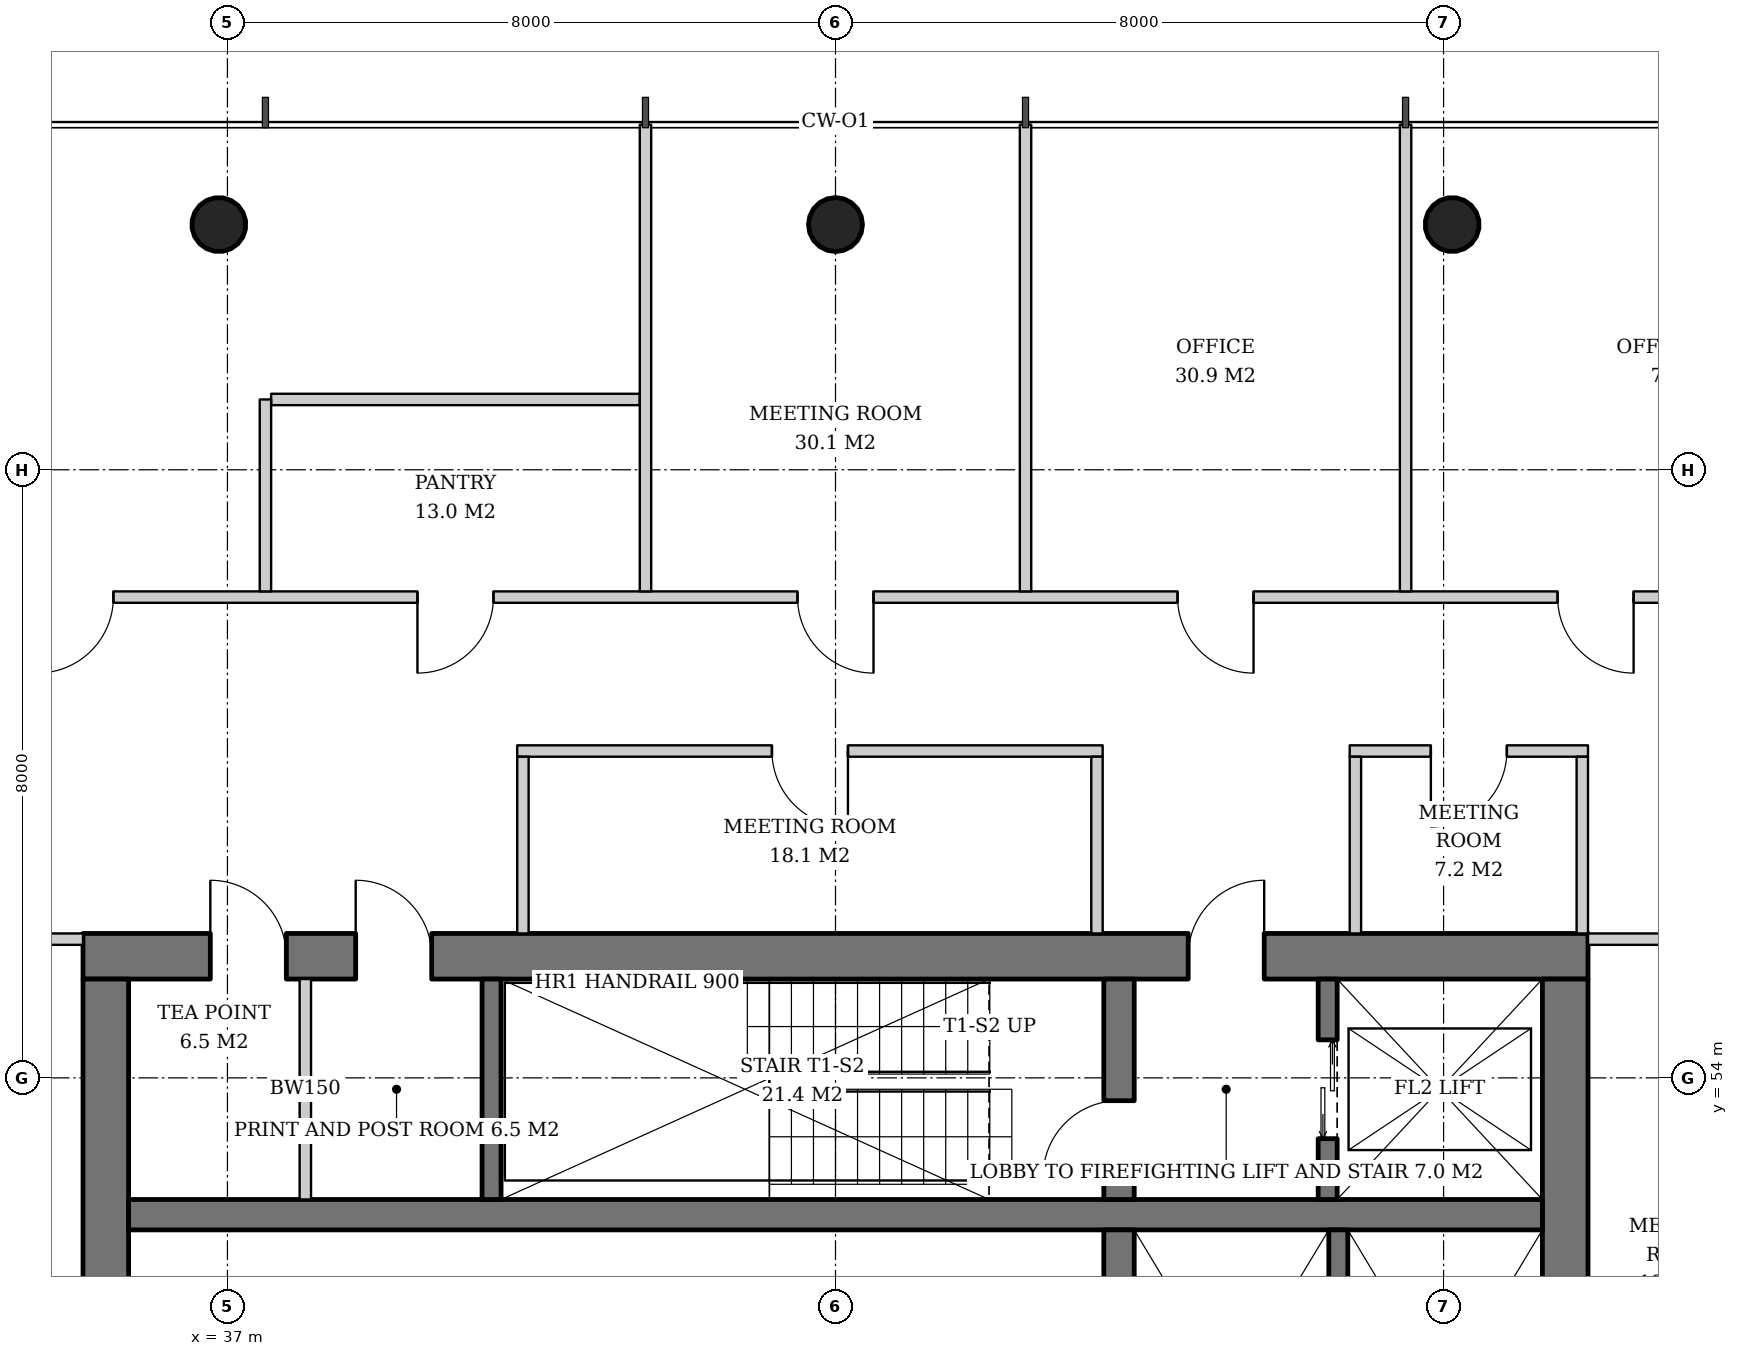
"""IFC4 building model, lengths in metres.
Left out: names, types, materials, properties, quantities, classifications, styles, units other than length and angle.
Written with IfcOpenShell. Run it as: python <this file> out.ifc"""

import sys

from ifc_helpers import new_model, si_unit, direction, frame, frame_2d, origin, origin_2d, place, context, subcontext, project, spatial, rectangle, hollow_circle, extrude, element, fill, save


model = new_model("IFC4")
c1 = context("Model", 3, precision=1e-05, world=origin(), true_north=direction((0.0, 1.0)))
c2 = subcontext(c1, "Body", "Model", "MODEL_VIEW")
j1 = project(units=[si_unit("LENGTHUNIT", "METRE"), si_unit("PLANEANGLEUNIT", "RADIAN")], contexts=[c1])
p1 = place(None, origin())
s1 = spatial("IfcSite", under=j1, at=p1, CompositionType="ELEMENT")
p2 = place(p1, origin())
s2 = spatial("IfcBuilding", under=s1, at=p2, CompositionType="ELEMENT")
p3 = place(p2, frame((0.0, 0.0, 169.2)))
s3 = spatial("IfcBuildingStorey", under=s2, at=p3, CompositionType="ELEMENT", Elevation=169.2)
p4 = place(p3, frame((53.132, 65.264, 0.0), z_axis=(-0.015923015547, -0.031974442509, 0.999361842679), x_axis=(0.895145027055, -0.445775033553, 0.0)))
e1 = element("IfcColumn", 1, at=p4, inside=s3, PredefinedType="COLUMN", context=c2, shape_type="SweptSolid", body=[
    extrude(hollow_circle(Radius=0.355, WallThickness=0.025, at=origin_2d()), origin(), (0.0, 0.0, 1.0), 3.802),
])
p5 = place(p3, frame((45.0, 65.264, 0.0), z_axis=(0.0, -0.031978496719, 0.999488557087), x_axis=(1.0, 0.0, 0.0)))
e2 = element("IfcColumn", 2, at=p5, inside=s3, PredefinedType="COLUMN", context=c2, shape_type="SweptSolid", body=[
    extrude(hollow_circle(Radius=0.355, WallThickness=0.025, at=origin_2d()), origin(), (0.0, 0.0, 1.0), 3.802),
])
p6 = place(p3, frame((36.868, 65.264, 0.0), z_axis=(0.015923015547, -0.031974442509, 0.999361842679), x_axis=(0.895145027055, 0.445775033553, 0.0)))
e3 = element("IfcColumn", 3, at=p6, inside=s3, PredefinedType="COLUMN", context=c2, shape_type="SweptSolid", body=[
    extrude(hollow_circle(Radius=0.355, WallThickness=0.025, at=origin_2d()), origin(), (0.0, 0.0, 1.0), 3.802),
])
p7 = place(p3, frame((35.1, 55.6, 0.0), z_axis=(0.0, 0.0, 1.0), x_axis=(1.0, 0.0, 0.0)))
e4 = element("IfcWall", 4, at=p7, inside=s3, PredefinedType="SHEAR", context=c2, shape_type="SweptSolid", body=[
    extrude(rectangle(XDim=19.8, YDim=0.6, at=frame_2d((9.9, 0.0))), origin(), (0.0, 0.0, 1.0), 3.8),
])
p8 = place(p7, frame((14.54, 0.0, 0.0)))
e5 = element("IfcOpeningElement", 5, at=p8, cuts=e4, PredefinedType="OPENING", context=c2, shape_type="SweptSolid", body=[
    extrude(rectangle(XDim=1.0, YDim=2.1, at=frame_2d((0.5, 1.05))), frame((0.0, 0.31, 0.0), z_axis=(0.0, -1.0, 0.0), x_axis=(1.0, 0.0, 0.0)), (0.0, 0.0, 1.0), 0.62),
])
p9 = place(p7, frame((1.675, 0.0, 0.0)))
e6 = element("IfcOpeningElement", 6, at=p9, cuts=e4, PredefinedType="OPENING", context=c2, shape_type="SweptSolid", body=[
    extrude(rectangle(XDim=1.0, YDim=2.1, at=frame_2d((0.5, 1.05))), frame((0.0, 0.31, 0.0), z_axis=(0.0, -1.0, 0.0), x_axis=(1.0, 0.0, 0.0)), (0.0, 0.0, 1.0), 0.62),
])
p10 = place(p7, frame((3.587, 0.0, 0.0)))
e7 = element("IfcOpeningElement", 7, at=p10, cuts=e4, PredefinedType="OPENING", context=c2, shape_type="SweptSolid", body=[
    extrude(rectangle(XDim=1.0, YDim=2.1, at=frame_2d((0.5, 1.05))), frame((0.0, 0.31, 0.0), z_axis=(0.0, -1.0, 0.0), x_axis=(1.0, 0.0, 0.0)), (0.0, 0.0, 1.0), 0.62),
])
p11 = place(p3, frame((35.4, 36.7, 0.0), z_axis=(0.0, 0.0, 1.0), x_axis=(0.0, 1.0, 0.0)))
e8 = element("IfcWall", 8, at=p11, inside=s3, PredefinedType="SHEAR", context=c2, shape_type="SweptSolid", body=[
    extrude(rectangle(XDim=18.6, YDim=0.6, at=frame_2d((9.3, 0.0))), origin(), (0.0, 0.0, 1.0), 3.8),
])
p12 = place(p11, frame((8.4, 0.0, 0.0)))
e9 = element("IfcOpeningElement", 9, at=p12, cuts=e8, PredefinedType="OPENING", context=c2, shape_type="SweptSolid", body=[
    extrude(rectangle(XDim=1.8, YDim=2.4, at=frame_2d((0.9, 1.2))), frame((0.0, 0.31, 0.0), z_axis=(0.0, -1.0, 0.0), x_axis=(1.0, 0.0, 0.0)), (0.0, 0.0, 1.0), 0.62),
])
p13 = place(p3, frame((54.6, 36.7, 0.0), z_axis=(0.0, 0.0, 1.0), x_axis=(0.0, 1.0, 0.0)))
e10 = element("IfcWall", 10, at=p13, inside=s3, PredefinedType="SHEAR", context=c2, shape_type="SweptSolid", body=[
    extrude(rectangle(XDim=18.6, YDim=0.6, at=frame_2d((9.3, 0.0))), origin(), (0.0, 0.0, 1.0), 3.8),
])
p14 = place(p13, frame((8.4, 0.0, 0.0)))
e11 = element("IfcOpeningElement", 11, at=p14, cuts=e10, PredefinedType="OPENING", context=c2, shape_type="SweptSolid", body=[
    extrude(rectangle(XDim=1.8, YDim=2.4, at=frame_2d((0.9, 1.2))), frame((0.0, 0.31, 0.0), z_axis=(0.0, -1.0, 0.0), x_axis=(1.0, 0.0, 0.0)), (0.0, 0.0, 1.0), 0.62),
])
p15 = place(p3, frame((35.7, 52.2, 0.0), z_axis=(0.0, 0.0, 1.0), x_axis=(1.0, 0.0, 0.0)))
e12 = element("IfcWall", 12, at=p15, inside=s3, PredefinedType="SHEAR", context=c2, shape_type="SweptSolid", body=[
    extrude(rectangle(XDim=18.6, YDim=0.4, at=frame_2d((9.3, 0.0))), origin(), (0.0, 0.0, 1.0), 3.8),
])
p16 = place(p3, frame((48.73, 40.0, 0.0), z_axis=(0.0, 0.0, 1.0), x_axis=(0.0, 1.0, 0.0)))
e13 = element("IfcWall", 13, at=p16, inside=s3, PredefinedType="SHEAR", context=c2, shape_type="SweptSolid", body=[
    extrude(rectangle(XDim=12.0, YDim=0.4, at=frame_2d((6.0, 0.0))), origin(), (0.0, 0.0, 1.0), 3.8),
])
p17 = place(p3, frame((48.73, 52.4, 0.0), z_axis=(0.0, 0.0, 1.0), x_axis=(0.0, 1.0, 0.0)))
e14 = element("IfcWall", 14, at=p17, inside=s3, PredefinedType="SHEAR", context=c2, shape_type="SweptSolid", body=[
    extrude(rectangle(XDim=2.9, YDim=0.4, at=frame_2d((1.45, 0.0))), origin(), (0.0, 0.0, 1.0), 3.8),
])
p18 = place(p17, frame((0.3, 0.0, 0.0)))
e15 = element("IfcOpeningElement", 15, at=p18, cuts=e14, PredefinedType="OPENING", context=c2, shape_type="SweptSolid", body=[
    extrude(rectangle(XDim=1.0, YDim=2.1, at=frame_2d((0.5, 1.05))), frame((0.0, 0.21, 0.0), z_axis=(0.0, -1.0, 0.0), x_axis=(1.0, 0.0, 0.0)), (0.0, 0.0, 1.0), 0.42),
])
p19 = place(p3, frame((40.475, 52.4, 0.0), z_axis=(0.0, 0.0, 1.0), x_axis=(0.0, 1.0, 0.0)))
e16 = element("IfcWall", 16, at=p19, inside=s3, PredefinedType="SHEAR", context=c2, shape_type="SweptSolid", body=[
    extrude(rectangle(XDim=2.9, YDim=0.25, at=frame_2d((1.45, 0.0))), origin(), (0.0, 0.0, 1.0), 3.8),
])
p20 = place(p3, frame((51.475, 52.4, 0.0), z_axis=(0.0, 0.0, 1.0), x_axis=(0.0, 1.0, 0.0)))
e17 = element("IfcWall", 17, at=p20, inside=s3, PredefinedType="SHEAR", context=c2, shape_type="SweptSolid", body=[
    extrude(rectangle(XDim=2.9, YDim=0.25, at=frame_2d((1.45, 0.0))), origin(), (0.0, 0.0, 1.0), 3.8),
])
p21 = place(p20, frame((0.8, 0.0, 0.0)))
e18 = element("IfcOpeningElement", 18, at=p21, cuts=e17, PredefinedType="OPENING", context=c2, shape_type="SweptSolid", body=[
    extrude(rectangle(XDim=1.3, YDim=2.2, at=frame_2d((0.65, 1.1))), frame((0.0, 0.135, 0.0), z_axis=(0.0, -1.0, 0.0), x_axis=(1.0, 0.0, 0.0)), (0.0, 0.0, 1.0), 0.27),
])
p22 = place(p3, frame((51.615, 47.75, 0.0), z_axis=(0.0, 0.0, 1.0), x_axis=(0.0, 1.0, 0.0)))
e19 = element("IfcWall", 19, at=p22, inside=s3, PredefinedType="SHEAR", context=c2, shape_type="SweptSolid", body=[
    extrude(rectangle(XDim=4.25, YDim=0.25, at=frame_2d((2.125, 0.0))), origin(), (0.0, 0.0, 1.0), 3.8),
])
p23 = place(p3, frame((38.025, 52.4, 0.0), z_axis=(0.0, 0.0, 1.0), x_axis=(0.0, 1.0, 0.0)))
e20 = element("IfcWall", 20, at=p23, inside=s3, PredefinedType="SOLIDWALL", context=c2, shape_type="SweptSolid", body=[
    extrude(rectangle(XDim=2.9, YDim=0.15, at=frame_2d((1.45, 0.0))), origin(), (0.0, 0.0, 1.0), 3.62),
])
p24 = place(p3, frame((54.9, 55.825, 0.0), z_axis=(0.0, 0.0, 1.0), x_axis=(1.0, 0.0, 0.0)))
e21 = element("IfcWall", 21, at=p24, inside=s3, PredefinedType="PARTITIONING", context=c2, shape_type="SweptSolid", body=[
    extrude(rectangle(XDim=2.325, YDim=0.15, at=frame_2d((1.163, 0.0))), origin(), (0.0, 0.0, 1.0), 3.62),
])
p25 = place(p3, frame((54.9, 58.3, 0.0), z_axis=(0.0, 0.0, 1.0), x_axis=(-1.0, 0.0, 0.0)))
e22 = element("IfcWall", 22, at=p25, inside=s3, PredefinedType="PARTITIONING", context=c2, shape_type="SweptSolid", body=[
    extrude(rectangle(XDim=3.135, YDim=0.15, at=frame_2d((1.567, 0.0))), origin(), (0.0, 0.0, 1.0), 2.92),
])
p26 = place(p25, frame((1.067, 0.0, 0.0)))
e23 = element("IfcOpeningElement", 23, at=p26, cuts=e22, PredefinedType="OPENING", context=c2, shape_type="SweptSolid", body=[
    extrude(rectangle(XDim=1.0, YDim=2.1, at=frame_2d((0.5, 1.05))), frame((0.0, 0.085, 0.0), z_axis=(0.0, -1.0, 0.0), x_axis=(1.0, 0.0, 0.0)), (0.0, 0.0, 1.0), 0.17),
])
p27 = place(p3, frame((54.825, 55.9, 0.0), z_axis=(0.0, 0.0, 1.0), x_axis=(0.0, 1.0, 0.0)))
e24 = element("IfcWall", 24, at=p27, inside=s3, PredefinedType="PARTITIONING", context=c2, shape_type="SweptSolid", body=[
    extrude(rectangle(XDim=2.325, YDim=0.15, at=frame_2d((1.163, 0.0))), origin(), (0.0, 0.0, 1.0), 2.867),
])
p28 = place(p3, frame((51.84, 55.9, 0.0), z_axis=(0.0, 0.0, 1.0), x_axis=(0.0, 1.0, 0.0)))
e25 = element("IfcWall", 25, at=p28, inside=s3, PredefinedType="PARTITIONING", context=c2, shape_type="SweptSolid", body=[
    extrude(rectangle(XDim=2.325, YDim=0.15, at=frame_2d((1.163, 0.0))), origin(), (0.0, 0.0, 1.0), 3.62),
])
p29 = place(p3, frame((48.515, 58.3, 0.0), z_axis=(0.0, 0.0, 1.0), x_axis=(-1.0, 0.0, 0.0)))
e26 = element("IfcWall", 26, at=p29, inside=s3, PredefinedType="PARTITIONING", context=c2, shape_type="SweptSolid", body=[
    extrude(rectangle(XDim=7.702, YDim=0.15, at=frame_2d((3.851, 0.0))), origin(), (0.0, 0.0, 1.0), 2.867),
])
p30 = place(p29, frame((3.351, 0.0, 0.0)))
e27 = element("IfcOpeningElement", 27, at=p30, cuts=e26, PredefinedType="OPENING", context=c2, shape_type="SweptSolid", body=[
    extrude(rectangle(XDim=1.0, YDim=2.1, at=frame_2d((0.5, 1.05))), frame((0.0, 0.085, 0.0), z_axis=(0.0, -1.0, 0.0), x_axis=(1.0, 0.0, 0.0)), (0.0, 0.0, 1.0), 0.17),
])
for number, where, z_axis, x_axis in (
    (28, (48.44, 55.9, 0.0), (0.0, 0.0, 1.0), (0.0, 1.0, 0.0)),
    (29, (40.887, 55.9, 0.0), (0.0, 0.0, 1.0), (0.0, 1.0, 0.0)),
):
    element("IfcWall", number, at=place(p3, frame(where, z_axis=z_axis, x_axis=x_axis)), inside=s3, PredefinedType="PARTITIONING", context=c2, shape_type="SweptSolid", body=[
        extrude(rectangle(XDim=2.325, YDim=0.15, at=frame_2d((1.163, 0.0))), origin(), (0.0, 0.0, 1.0), 3.62),
    ])
p31 = place(p3, frame((35.1, 55.825, 0.0), z_axis=(0.0, 0.0, 1.0), x_axis=(-1.0, 0.0, 0.0)))
e30 = element("IfcWall", 30, at=p31, inside=s3, PredefinedType="PARTITIONING", context=c2, shape_type="SweptSolid", body=[
    extrude(rectangle(XDim=2.325, YDim=0.15, at=frame_2d((1.163, 0.0))), origin(), (0.0, 0.0, 1.0), 2.867),
])
p32 = place(p3, frame((42.425, 62.925, 0.0), z_axis=(0.0, 0.0, 1.0), x_axis=(-1.0, 0.0, 0.0)))
e31 = element("IfcWall", 31, at=p32, inside=s3, PredefinedType="PARTITIONING", context=c2, shape_type="SweptSolid", body=[
    extrude(rectangle(XDim=4.85, YDim=0.15, at=frame_2d((2.425, 0.0))), origin(), (0.0, 0.0, 1.0), 2.867),
])
p33 = place(p3, frame((59.271, 60.325, 0.0), z_axis=(0.0, 0.0, 1.0), x_axis=(-1.0, 0.0, 0.0)))
e32 = element("IfcWall", 32, at=p33, inside=s3, PredefinedType="PARTITIONING", context=c2, shape_type="SweptSolid", body=[
    extrude(rectangle(XDim=28.543, YDim=0.15, at=frame_2d((14.271, 0.0))), origin(), (0.0, 0.0, 1.0), 2.867),
])
p34 = place(p33, frame((3.771, 0.0, 0.0)))
e33 = element("IfcOpeningElement", 33, at=p34, cuts=e32, PredefinedType="OPENING", context=c2, shape_type="SweptSolid", body=[
    extrude(rectangle(XDim=1.0, YDim=2.1, at=frame_2d((0.5, 1.05))), frame((0.0, 0.085, 0.0), z_axis=(0.0, -1.0, 0.0), x_axis=(1.0, 0.0, 0.0)), (0.0, 0.0, 1.0), 0.17),
])
p35 = place(p33, frame((8.771, 0.0, 0.0)))
e34 = element("IfcOpeningElement", 34, at=p35, cuts=e32, PredefinedType="OPENING", context=c2, shape_type="SweptSolid", body=[
    extrude(rectangle(XDim=1.0, YDim=2.1, at=frame_2d((0.5, 1.05))), frame((0.0, 0.085, 0.0), z_axis=(0.0, -1.0, 0.0), x_axis=(1.0, 0.0, 0.0)), (0.0, 0.0, 1.0), 0.17),
])
p36 = place(p33, frame((13.771, 0.0, 0.0)))
e35 = element("IfcOpeningElement", 35, at=p36, cuts=e32, PredefinedType="OPENING", context=c2, shape_type="SweptSolid", body=[
    extrude(rectangle(XDim=1.0, YDim=2.1, at=frame_2d((0.5, 1.05))), frame((0.0, 0.085, 0.0), z_axis=(0.0, -1.0, 0.0), x_axis=(1.0, 0.0, 0.0)), (0.0, 0.0, 1.0), 0.17),
])
p37 = place(p33, frame((18.771, 0.0, 0.0)))
e36 = element("IfcOpeningElement", 36, at=p37, cuts=e32, PredefinedType="OPENING", context=c2, shape_type="SweptSolid", body=[
    extrude(rectangle(XDim=1.0, YDim=2.1, at=frame_2d((0.5, 1.05))), frame((0.0, 0.085, 0.0), z_axis=(0.0, -1.0, 0.0), x_axis=(1.0, 0.0, 0.0)), (0.0, 0.0, 1.0), 0.17),
])
p38 = place(p33, frame((23.771, 0.0, 0.0)))
e37 = element("IfcOpeningElement", 37, at=p38, cuts=e32, PredefinedType="OPENING", context=c2, shape_type="SweptSolid", body=[
    extrude(rectangle(XDim=1.0, YDim=2.1, at=frame_2d((0.5, 1.05))), frame((0.0, 0.085, 0.0), z_axis=(0.0, -1.0, 0.0), x_axis=(1.0, 0.0, 0.0)), (0.0, 0.0, 1.0), 0.17),
])
for number, where, z_axis, x_axis in (
    (38, (52.5, 60.4, 0.0), (0.0, 0.0, 1.0), (0.0, 1.0, 0.0)),
    (39, (47.5, 60.4, 0.0), (0.0, 0.0, 1.0), (0.0, 1.0, 0.0)),
    (40, (42.5, 60.4, 0.0), (0.0, 0.0, 1.0), (0.0, 1.0, 0.0)),
):
    element("IfcWall", number, at=place(p3, frame(where, z_axis=z_axis, x_axis=x_axis)), inside=s3, PredefinedType="PARTITIONING", context=c2, shape_type="SweptSolid", body=[
        extrude(rectangle(XDim=6.14, YDim=0.15, at=frame_2d((3.07, 0.0))), origin(), (0.0, 0.0, 1.0), 3.12),
    ])
p39 = place(p3, frame((37.5, 60.4, 0.0), z_axis=(0.0, 0.0, 1.0), x_axis=(0.0, 1.0, 0.0)))
e41 = element("IfcWall", 41, at=p39, inside=s3, PredefinedType="PARTITIONING", context=c2, shape_type="SweptSolid", body=[
    extrude(rectangle(XDim=2.525, YDim=0.15, at=frame_2d((1.263, 0.0))), origin(), (0.0, 0.0, 1.0), 3.62),
])
p40 = place(p21, origin())
e42 = element("IfcDoor", 42, at=p40, inside=s3, OperationType="DOUBLE_DOOR_SLIDING", PredefinedType="DOOR", context=c2, shape_type="SweptSolid", body=[
    extrude(rectangle(XDim=1.3, YDim=2.2, at=frame_2d((0.65, 1.1))), frame((0.0, 0.025, 0.0), z_axis=(0.0, -1.0, 0.0), x_axis=(1.0, 0.0, 0.0)), (0.0, 0.0, 1.0), 0.05),
])
fill(e18, e42)
p41 = place(p18, origin())
e43 = element("IfcDoor", 43, at=p41, inside=s3, OperationType="SINGLE_SWING_LEFT", PredefinedType="DOOR", context=c2, shape_type="SweptSolid", body=[
    extrude(rectangle(XDim=1.0, YDim=2.1, at=frame_2d((0.5, 1.05))), frame((0.0, 0.025, 0.0), z_axis=(0.0, -1.0, 0.0), x_axis=(1.0, 0.0, 0.0)), (0.0, 0.0, 1.0), 0.05),
])
fill(e15, e43)
p42 = place(p8, origin())
e44 = element("IfcDoor", 44, at=p42, inside=s3, OperationType="SINGLE_SWING_RIGHT", PredefinedType="DOOR", context=c2, shape_type="SweptSolid", body=[
    extrude(rectangle(XDim=1.0, YDim=2.1, at=frame_2d((0.5, 1.05))), frame((0.0, 0.025, 0.0), z_axis=(0.0, -1.0, 0.0), x_axis=(1.0, 0.0, 0.0)), (0.0, 0.0, 1.0), 0.05),
])
fill(e5, e44)
p43 = place(p9, origin())
e45 = element("IfcDoor", 45, at=p43, inside=s3, OperationType="SINGLE_SWING_LEFT", PredefinedType="DOOR", context=c2, shape_type="SweptSolid", body=[
    extrude(rectangle(XDim=1.0, YDim=2.1, at=frame_2d((0.5, 1.05))), frame((0.0, -0.24, 0.0), z_axis=(0.0, -1.0, 0.0), x_axis=(1.0, 0.0, 0.0)), (0.0, 0.0, 1.0), 0.05),
])
fill(e6, e45)
p44 = place(p10, origin())
e46 = element("IfcDoor", 46, at=p44, inside=s3, OperationType="SINGLE_SWING_LEFT", PredefinedType="DOOR", context=c2, shape_type="SweptSolid", body=[
    extrude(rectangle(XDim=1.0, YDim=2.1, at=frame_2d((0.5, 1.05))), frame((0.0, -0.24, 0.0), z_axis=(0.0, -1.0, 0.0), x_axis=(1.0, 0.0, 0.0)), (0.0, 0.0, 1.0), 0.05),
])
fill(e7, e46)
p45 = place(p26, origin())
e47 = element("IfcDoor", 47, at=p45, inside=s3, OperationType="SINGLE_SWING_RIGHT", PredefinedType="DOOR", context=c2, shape_type="SweptSolid", body=[
    extrude(rectangle(XDim=1.0, YDim=2.1, at=frame_2d((0.5, 1.05))), frame((0.0, 0.025, 0.0), z_axis=(0.0, -1.0, 0.0), x_axis=(1.0, 0.0, 0.0)), (0.0, 0.0, 1.0), 0.05),
])
fill(e23, e47)
p46 = place(p30, origin())
e48 = element("IfcDoor", 48, at=p46, inside=s3, OperationType="SINGLE_SWING_LEFT", PredefinedType="DOOR", context=c2, shape_type="SweptSolid", body=[
    extrude(rectangle(XDim=1.0, YDim=2.1, at=frame_2d((0.5, 1.05))), frame((0.0, 0.025, 0.0), z_axis=(0.0, -1.0, 0.0), x_axis=(1.0, 0.0, 0.0)), (0.0, 0.0, 1.0), 0.05),
])
fill(e27, e48)
p47 = place(p34, origin())
e49 = element("IfcDoor", 49, at=p47, inside=s3, OperationType="SINGLE_SWING_LEFT", PredefinedType="DOOR", context=c2, shape_type="SweptSolid", body=[
    extrude(rectangle(XDim=1.0, YDim=2.1, at=frame_2d((0.5, 1.05))), frame((0.0, 0.025, 0.0), z_axis=(0.0, -1.0, 0.0), x_axis=(1.0, 0.0, 0.0)), (0.0, 0.0, 1.0), 0.05),
])
fill(e33, e49)
p48 = place(p35, origin())
e50 = element("IfcDoor", 50, at=p48, inside=s3, OperationType="SINGLE_SWING_LEFT", PredefinedType="DOOR", context=c2, shape_type="SweptSolid", body=[
    extrude(rectangle(XDim=1.0, YDim=2.1, at=frame_2d((0.5, 1.05))), frame((0.0, 0.025, 0.0), z_axis=(0.0, -1.0, 0.0), x_axis=(1.0, 0.0, 0.0)), (0.0, 0.0, 1.0), 0.05),
])
fill(e34, e50)
p49 = place(p36, origin())
e51 = element("IfcDoor", 51, at=p49, inside=s3, OperationType="SINGLE_SWING_LEFT", PredefinedType="DOOR", context=c2, shape_type="SweptSolid", body=[
    extrude(rectangle(XDim=1.0, YDim=2.1, at=frame_2d((0.5, 1.05))), frame((0.0, 0.025, 0.0), z_axis=(0.0, -1.0, 0.0), x_axis=(1.0, 0.0, 0.0)), (0.0, 0.0, 1.0), 0.05),
])
fill(e35, e51)
p50 = place(p37, origin())
e52 = element("IfcDoor", 52, at=p50, inside=s3, OperationType="SINGLE_SWING_RIGHT", PredefinedType="DOOR", context=c2, shape_type="SweptSolid", body=[
    extrude(rectangle(XDim=1.0, YDim=2.1, at=frame_2d((0.5, 1.05))), frame((0.0, 0.025, 0.0), z_axis=(0.0, -1.0, 0.0), x_axis=(1.0, 0.0, 0.0)), (0.0, 0.0, 1.0), 0.05),
])
fill(e36, e52)
p51 = place(p38, origin())
e53 = element("IfcDoor", 53, at=p51, inside=s3, OperationType="SINGLE_SWING_RIGHT", PredefinedType="DOOR", context=c2, shape_type="SweptSolid", body=[
    extrude(rectangle(XDim=1.0, YDim=2.1, at=frame_2d((0.5, 1.05))), frame((0.0, 0.025, 0.0), z_axis=(0.0, -1.0, 0.0), x_axis=(1.0, 0.0, 0.0)), (0.0, 0.0, 1.0), 0.05),
])
fill(e37, e53)
save(model, sys.argv[1])
